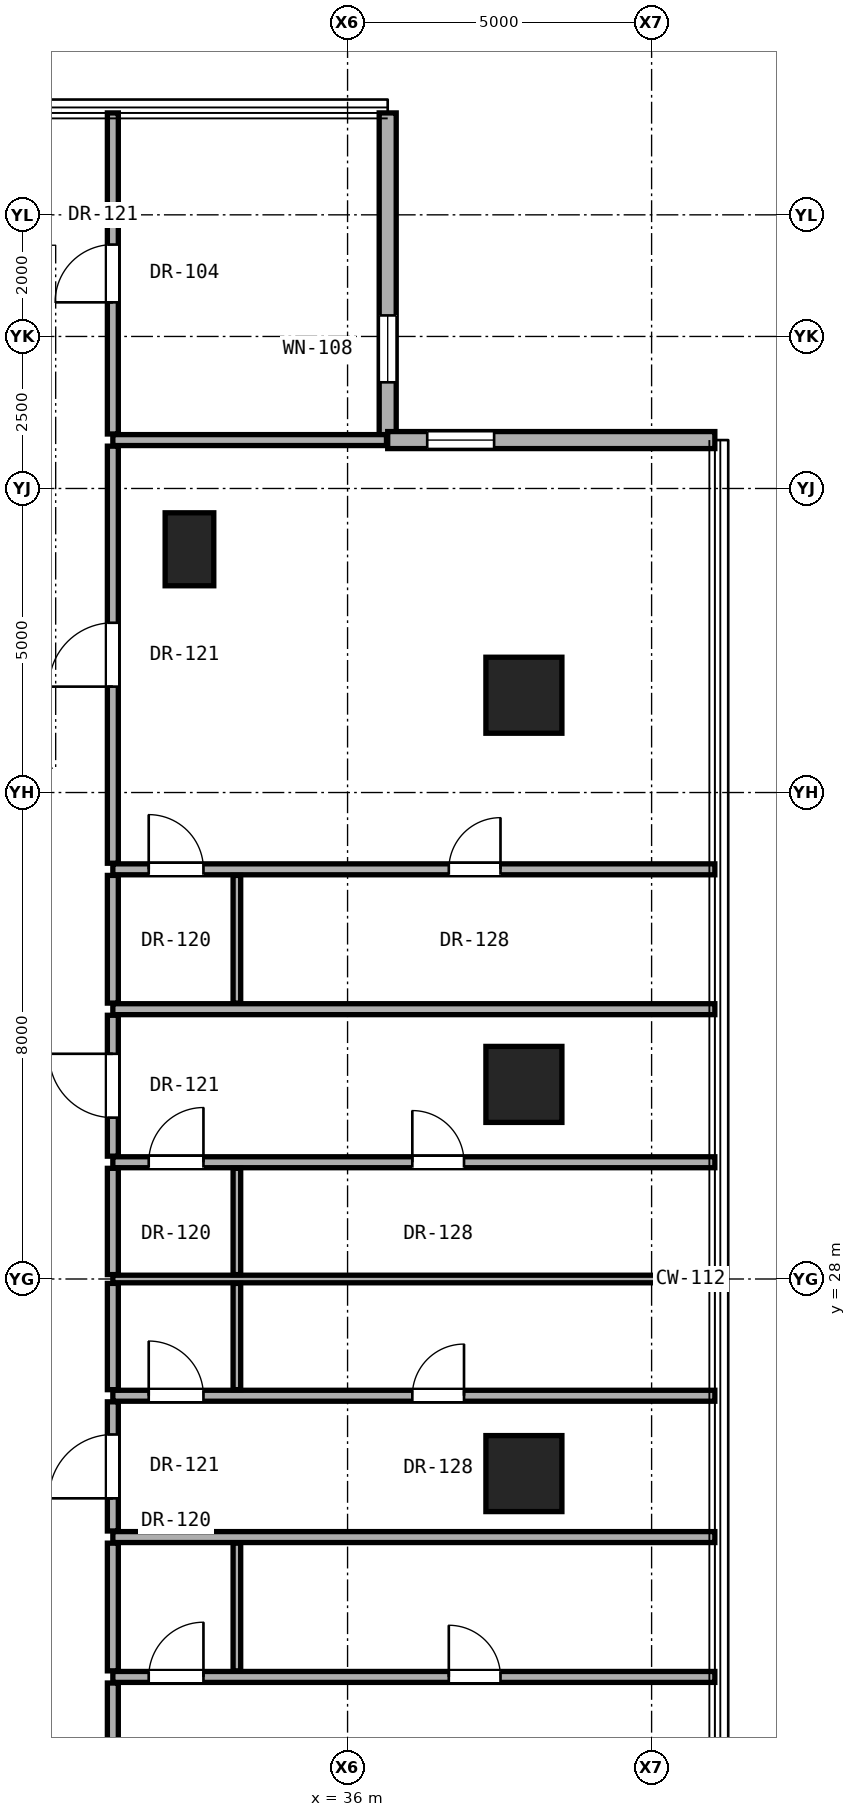
"""IFC4 building model, lengths in metres.
Left out: names, types, materials, properties, quantities, classifications, styles, units other than length and angle.
Written with IfcOpenShell. Run it as: python <this file> out.ifc"""

import sys

from ifc_helpers import new_model, si_unit, direction, frame, frame_2d, origin, origin_2d, place, context, subcontext, project, spatial, rectangle, hollow_rectangle, extrude, element, fill, save


model = new_model("IFC4")
c1 = context("Model", 3, precision=1e-05, world=origin(), true_north=direction((0.0, 1.0)))
c2 = subcontext(c1, "Body", "Model", "MODEL_VIEW")
j1 = project(units=[si_unit("LENGTHUNIT", "METRE"), si_unit("PLANEANGLEUNIT", "RADIAN")], contexts=[c1])
p1 = place(None, origin())
s1 = spatial("IfcSite", under=j1, at=p1, CompositionType="ELEMENT")
p2 = place(p1, origin())
s2 = spatial("IfcBuilding", under=s1, at=p2, CompositionType="ELEMENT")
p3 = place(p2, frame((0.0, 0.0, 29.0)))
s3 = spatial("IfcBuildingStorey", under=s2, at=p3, CompositionType="ELEMENT", Elevation=29.0)
for number, where, z_axis, x_axis in (
    (1, (38.9, 24.8, 0.0), (0.0, 0.0, 1.0), (1.0, 0.0, 0.0)),
    (2, (38.9, 31.2, 0.0), (0.0, 0.0, 1.0), (1.0, 0.0, 0.0)),
    (3, (38.9, 37.6, 0.0), (0.0, 0.0, 1.0), (1.0, 0.0, 0.0)),
):
    element("IfcColumn", number, at=place(p3, frame(where, z_axis=z_axis, x_axis=x_axis)), inside=s3, PredefinedType="COLUMN", context=c2, shape_type="SweptSolid", body=[
        extrude(hollow_rectangle(XDim=1.25, YDim=1.25, WallThickness=0.07, at=origin_2d()), origin(), (0.0, 0.0, 1.0), 3.3),
    ])
p4 = place(p3, frame((33.4, 40.0, 0.0), z_axis=(0.0, 0.0, 1.0), x_axis=(1.0, 0.0, 0.0)))
e4 = element("IfcColumn", 4, at=p4, inside=s3, PredefinedType="PILASTER", context=c2, shape_type="SweptSolid", body=[
    extrude(rectangle(XDim=0.8, YDim=1.2, at=origin_2d()), origin(), (0.0, 0.0, 1.0), 3.3),
])
p5 = place(p3, frame((36.66, 41.796, 0.0), z_axis=(0.0, 0.0, 1.0), x_axis=(0.0, 1.0, 0.0)))
e5 = element("IfcWall", 5, at=p5, inside=s3, PredefinedType="SOLIDWALL", context=c2, shape_type="SweptSolid", body=[
    extrude(rectangle(XDim=5.38, YDim=0.28, at=frame_2d((2.69, 0.0))), origin(), (0.0, 0.0, 1.0), 3.04),
])
p6 = place(p5, frame((0.95, 0.0, 0.85)))
e6 = element("IfcOpeningElement", 6, at=p6, cuts=e5, PredefinedType="OPENING", context=c2, shape_type="SweptSolid", body=[
    extrude(rectangle(XDim=1.1, YDim=2.0, at=frame_2d((0.55, 1.0))), frame((0.0, 0.15, 0.0), z_axis=(0.0, -1.0, 0.0), x_axis=(1.0, 0.0, 0.0)), (0.0, 0.0, 1.0), 0.3),
])
p7 = place(p3, frame((42.04, 41.796, 0.0), z_axis=(0.0, 0.0, 1.0), x_axis=(-1.0, 0.0, 0.0)))
e7 = element("IfcWall", 7, at=p7, inside=s3, PredefinedType="SOLIDWALL", context=c2, shape_type="SweptSolid", body=[
    extrude(rectangle(XDim=5.38, YDim=0.28, at=frame_2d((2.69, 0.0))), origin(), (0.0, 0.0, 1.0), 3.04),
])
p8 = place(p7, frame((3.63, 0.0, 0.85)))
e8 = element("IfcOpeningElement", 8, at=p8, cuts=e7, PredefinedType="OPENING", context=c2, shape_type="SweptSolid", body=[
    extrude(rectangle(XDim=1.1, YDim=2.0, at=frame_2d((0.55, 1.0))), frame((0.0, 0.15, 0.0), z_axis=(0.0, -1.0, 0.0), x_axis=(1.0, 0.0, 0.0)), (0.0, 0.0, 1.0), 0.3),
])
p9 = place(p3, frame((32.14, 21.456, 0.0), z_axis=(0.0, 0.0, 1.0), x_axis=(1.0, 0.0, 0.0)))
e9 = element("IfcWall", 9, at=p9, inside=s3, PredefinedType="PARTITIONING", context=c2, shape_type="SweptSolid", body=[
    extrude(rectangle(XDim=9.9, YDim=0.18, at=frame_2d((4.95, 0.0))), origin(), (0.0, 0.0, 1.0), 2.125),
])
p10 = place(p9, frame((5.525, 0.0, 0.0)))
e10 = element("IfcOpeningElement", 10, at=p10, cuts=e9, PredefinedType="OPENING", context=c2, shape_type="SweptSolid", body=[
    extrude(rectangle(XDim=0.85, YDim=2.01, at=frame_2d((0.425, 1.005))), frame((0.0, 0.1, 0.0), z_axis=(0.0, -1.0, 0.0), x_axis=(1.0, 0.0, 0.0)), (0.0, 0.0, 1.0), 0.2),
])
p11 = place(p9, frame((0.59, 0.0, 0.0)))
e11 = element("IfcOpeningElement", 11, at=p11, cuts=e9, PredefinedType="OPENING", context=c2, shape_type="SweptSolid", body=[
    extrude(rectangle(XDim=0.9, YDim=2.1, at=frame_2d((0.45, 1.05))), frame((0.0, 0.1, 0.0), z_axis=(0.0, -1.0, 0.0), x_axis=(1.0, 0.0, 0.0)), (0.0, 0.0, 1.0), 0.2),
])
p12 = place(p3, frame((32.14, 23.756, 0.0), z_axis=(0.0, 0.0, 1.0), x_axis=(1.0, 0.0, 0.0)))
e12 = element("IfcWall", 12, at=p12, inside=s3, PredefinedType="PARTITIONING", context=c2, shape_type="SweptSolid", body=[
    extrude(rectangle(XDim=9.9, YDim=0.18, at=frame_2d((4.95, 0.0))), origin(), (0.0, 0.0, 1.0), 2.125),
])
p13 = place(p3, frame((32.14, 26.08, 0.0), z_axis=(0.0, 0.0, 1.0), x_axis=(1.0, 0.0, 0.0)))
e13 = element("IfcWall", 13, at=p13, inside=s3, PredefinedType="PARTITIONING", context=c2, shape_type="SweptSolid", body=[
    extrude(rectangle(XDim=9.9, YDim=0.18, at=frame_2d((4.95, 0.0))), origin(), (0.0, 0.0, 1.0), 2.125),
])
p14 = place(p13, frame((4.925, 0.0, 0.0)))
e14 = element("IfcOpeningElement", 14, at=p14, cuts=e13, PredefinedType="OPENING", context=c2, shape_type="SweptSolid", body=[
    extrude(rectangle(XDim=0.85, YDim=2.01, at=frame_2d((0.425, 1.005))), frame((0.0, 0.1, 0.0), z_axis=(0.0, -1.0, 0.0), x_axis=(1.0, 0.0, 0.0)), (0.0, 0.0, 1.0), 0.2),
])
p15 = place(p13, frame((0.59, 0.0, 0.0)))
e15 = element("IfcOpeningElement", 15, at=p15, cuts=e13, PredefinedType="OPENING", context=c2, shape_type="SweptSolid", body=[
    extrude(rectangle(XDim=0.9, YDim=2.1, at=frame_2d((0.45, 1.05))), frame((0.0, 0.1, 0.0), z_axis=(0.0, -1.0, 0.0), x_axis=(1.0, 0.0, 0.0)), (0.0, 0.0, 1.0), 0.2),
])
p16 = place(p3, frame((32.14, 28.0, 0.0), z_axis=(0.0, 0.0, 1.0), x_axis=(1.0, 0.0, 0.0)))
e16 = element("IfcWall", 16, at=p16, inside=s3, PredefinedType="PARTITIONING", context=c2, shape_type="SweptSolid", body=[
    extrude(rectangle(XDim=9.9, YDim=0.125, at=frame_2d((4.95, 0.0))), origin(), (0.0, 0.0, 1.0), 2.125),
])
p17 = place(p3, frame((32.14, 29.92, 0.0), z_axis=(0.0, 0.0, 1.0), x_axis=(1.0, 0.0, 0.0)))
e17 = element("IfcWall", 17, at=p17, inside=s3, PredefinedType="PARTITIONING", context=c2, shape_type="SweptSolid", body=[
    extrude(rectangle(XDim=9.9, YDim=0.18, at=frame_2d((4.95, 0.0))), origin(), (0.0, 0.0, 1.0), 2.125),
])
p18 = place(p17, frame((4.925, 0.0, 0.0)))
e18 = element("IfcOpeningElement", 18, at=p18, cuts=e17, PredefinedType="OPENING", context=c2, shape_type="SweptSolid", body=[
    extrude(rectangle(XDim=0.85, YDim=2.01, at=frame_2d((0.425, 1.005))), frame((0.0, 0.1, 0.0), z_axis=(0.0, -1.0, 0.0), x_axis=(1.0, 0.0, 0.0)), (0.0, 0.0, 1.0), 0.2),
])
p19 = place(p17, frame((0.59, 0.0, 0.0)))
e19 = element("IfcOpeningElement", 19, at=p19, cuts=e17, PredefinedType="OPENING", context=c2, shape_type="SweptSolid", body=[
    extrude(rectangle(XDim=0.9, YDim=2.1, at=frame_2d((0.45, 1.05))), frame((0.0, 0.1, 0.0), z_axis=(0.0, -1.0, 0.0), x_axis=(1.0, 0.0, 0.0)), (0.0, 0.0, 1.0), 0.2),
])
p20 = place(p3, frame((32.14, 32.437, 0.0), z_axis=(0.0, 0.0, 1.0), x_axis=(1.0, 0.0, 0.0)))
e20 = element("IfcWall", 20, at=p20, inside=s3, PredefinedType="PARTITIONING", context=c2, shape_type="SweptSolid", body=[
    extrude(rectangle(XDim=9.9, YDim=0.18, at=frame_2d((4.95, 0.0))), origin(), (0.0, 0.0, 1.0), 2.125),
])
p21 = place(p3, frame((32.14, 34.737, 0.0), z_axis=(0.0, 0.0, 1.0), x_axis=(1.0, 0.0, 0.0)))
e21 = element("IfcWall", 21, at=p21, inside=s3, PredefinedType="PARTITIONING", context=c2, shape_type="SweptSolid", body=[
    extrude(rectangle(XDim=9.9, YDim=0.18, at=frame_2d((4.95, 0.0))), origin(), (0.0, 0.0, 1.0), 2.125),
])
p22 = place(p21, frame((5.525, 0.0, 0.0)))
e22 = element("IfcOpeningElement", 22, at=p22, cuts=e21, PredefinedType="OPENING", context=c2, shape_type="SweptSolid", body=[
    extrude(rectangle(XDim=0.85, YDim=2.01, at=frame_2d((0.425, 1.005))), frame((0.0, 0.1, 0.0), z_axis=(0.0, -1.0, 0.0), x_axis=(1.0, 0.0, 0.0)), (0.0, 0.0, 1.0), 0.2),
])
p23 = place(p21, frame((0.59, 0.0, 0.0)))
e23 = element("IfcOpeningElement", 23, at=p23, cuts=e21, PredefinedType="OPENING", context=c2, shape_type="SweptSolid", body=[
    extrude(rectangle(XDim=0.9, YDim=2.1, at=frame_2d((0.45, 1.05))), frame((0.0, 0.1, 0.0), z_axis=(0.0, -1.0, 0.0), x_axis=(1.0, 0.0, 0.0)), (0.0, 0.0, 1.0), 0.2),
])
p24 = place(p3, frame((32.14, 41.796, 0.0), z_axis=(0.0, 0.0, 1.0), x_axis=(1.0, 0.0, 0.0)))
e24 = element("IfcWall", 24, at=p24, inside=s3, PredefinedType="PARTITIONING", context=c2, shape_type="SweptSolid", body=[
    extrude(rectangle(XDim=4.5, YDim=0.18, at=frame_2d((2.25, 0.0))), origin(), (0.0, 0.0, 1.0), 3.06),
])
p25 = place(p3, frame((32.14, 14.304, 0.0), z_axis=(0.0, 0.0, 1.0), x_axis=(0.0, 1.0, 0.0)))
e25 = element("IfcWall", 25, at=p25, inside=s3, PredefinedType="PARTITIONING", context=c2, shape_type="SweptSolid", body=[
    extrude(rectangle(XDim=7.052, YDim=0.18, at=frame_2d((3.526, 0.0))), origin(), (0.0, 0.0, 1.0), 2.436),
])
p26 = place(p25, frame((3.001, 0.0, 0.0)))
e26 = element("IfcOpeningElement", 26, at=p26, cuts=e25, PredefinedType="OPENING", context=c2, shape_type="SweptSolid", body=[
    extrude(rectangle(XDim=1.05, YDim=2.2, at=frame_2d((0.525, 1.1))), frame((0.0, 0.1, 0.0), z_axis=(0.0, -1.0, 0.0), x_axis=(1.0, 0.0, 0.0)), (0.0, 0.0, 1.0), 0.2),
])
p27 = place(p3, frame((32.14, 21.556, 0.0), z_axis=(0.0, 0.0, 1.0), x_axis=(0.0, 1.0, 0.0)))
e27 = element("IfcWall", 27, at=p27, inside=s3, PredefinedType="PARTITIONING", context=c2, shape_type="SweptSolid", body=[
    extrude(rectangle(XDim=2.1, YDim=0.18, at=frame_2d((1.05, 0.0))), origin(), (0.0, 0.0, 1.0), 3.06),
])
p28 = place(p3, frame((32.14, 23.856, 0.0), z_axis=(0.0, 0.0, 1.0), x_axis=(0.0, 1.0, 0.0)))
e28 = element("IfcWall", 28, at=p28, inside=s3, PredefinedType="PARTITIONING", context=c2, shape_type="SweptSolid", body=[
    extrude(rectangle(XDim=2.124, YDim=0.18, at=frame_2d((1.062, 0.0))), origin(), (0.0, 0.0, 1.0), 2.279),
])
p29 = place(p28, frame((0.537, 0.0, 0.0)))
e29 = element("IfcOpeningElement", 29, at=p29, cuts=e28, PredefinedType="OPENING", context=c2, shape_type="SweptSolid", body=[
    extrude(rectangle(XDim=1.05, YDim=2.2, at=frame_2d((0.525, 1.1))), frame((0.0, 0.1, 0.0), z_axis=(0.0, -1.0, 0.0), x_axis=(1.0, 0.0, 0.0)), (0.0, 0.0, 1.0), 0.2),
])
for number, where, z_axis, x_axis in (
    (30, (32.14, 26.18, 0.0), (0.0, 0.0, 1.0), (0.0, 1.0, 0.0)),
    (31, (32.14, 28.073, 0.0), (0.0, 0.0, 1.0), (0.0, 1.0, 0.0)),
):
    element("IfcWall", number, at=place(p3, frame(where, z_axis=z_axis, x_axis=x_axis)), inside=s3, PredefinedType="PARTITIONING", context=c2, shape_type="SweptSolid", body=[
        extrude(rectangle(XDim=1.748, YDim=0.18, at=frame_2d((0.874, 0.0))), origin(), (0.0, 0.0, 1.0), 3.06),
    ])
p30 = place(p3, frame((32.14, 30.02, 0.0), z_axis=(0.0, 0.0, 1.0), x_axis=(0.0, 1.0, 0.0)))
e32 = element("IfcWall", 32, at=p30, inside=s3, PredefinedType="PARTITIONING", context=c2, shape_type="SweptSolid", body=[
    extrude(rectangle(XDim=2.317, YDim=0.18, at=frame_2d((1.158, 0.0))), origin(), (0.0, 0.0, 1.0), 2.279),
])
p31 = place(p30, frame((0.634, 0.0, 0.0)))
e33 = element("IfcOpeningElement", 33, at=p31, cuts=e32, PredefinedType="OPENING", context=c2, shape_type="SweptSolid", body=[
    extrude(rectangle(XDim=1.05, YDim=2.2, at=frame_2d((0.525, 1.1))), frame((0.0, 0.1, 0.0), z_axis=(0.0, -1.0, 0.0), x_axis=(1.0, 0.0, 0.0)), (0.0, 0.0, 1.0), 0.2),
])
p32 = place(p3, frame((32.14, 32.537, 0.0), z_axis=(0.0, 0.0, 1.0), x_axis=(0.0, 1.0, 0.0)))
e34 = element("IfcWall", 34, at=p32, inside=s3, PredefinedType="PARTITIONING", context=c2, shape_type="SweptSolid", body=[
    extrude(rectangle(XDim=2.1, YDim=0.18, at=frame_2d((1.05, 0.0))), origin(), (0.0, 0.0, 1.0), 3.06),
])
p33 = place(p3, frame((32.14, 34.837, 0.0), z_axis=(0.0, 0.0, 1.0), x_axis=(0.0, 1.0, 0.0)))
e35 = element("IfcWall", 35, at=p33, inside=s3, PredefinedType="PARTITIONING", context=c2, shape_type="SweptSolid", body=[
    extrude(rectangle(XDim=6.859, YDim=0.18, at=frame_2d((3.43, 0.0))), origin(), (0.0, 0.0, 1.0), 2.436),
])
p34 = place(p33, frame((2.905, 0.0, 0.0)))
e36 = element("IfcOpeningElement", 36, at=p34, cuts=e35, PredefinedType="OPENING", context=c2, shape_type="SweptSolid", body=[
    extrude(rectangle(XDim=1.05, YDim=2.2, at=frame_2d((0.525, 1.1))), frame((0.0, 0.1, 0.0), z_axis=(0.0, -1.0, 0.0), x_axis=(1.0, 0.0, 0.0)), (0.0, 0.0, 1.0), 0.2),
])
p35 = place(p3, frame((32.14, 41.896, 0.0), z_axis=(0.0, 0.0, 1.0), x_axis=(0.0, 1.0, 0.0)))
e37 = element("IfcWall", 37, at=p35, inside=s3, PredefinedType="PARTITIONING", context=c2, shape_type="SweptSolid", body=[
    extrude(rectangle(XDim=5.28, YDim=0.18, at=frame_2d((2.64, 0.0))), origin(), (0.0, 0.0, 1.0), 3.06),
])
p36 = place(p35, frame((2.165, 0.0, 0.0)))
e38 = element("IfcOpeningElement", 38, at=p36, cuts=e37, PredefinedType="OPENING", context=c2, shape_type="SweptSolid", body=[
    extrude(rectangle(XDim=0.95, YDim=2.15, at=frame_2d((0.475, 1.075))), frame((0.0, 0.1, 0.0), z_axis=(0.0, -1.0, 0.0), x_axis=(1.0, 0.0, 0.0)), (0.0, 0.0, 1.0), 0.2),
])
p37 = place(p3, frame((34.18, 21.556, 0.0), z_axis=(0.0, 0.0, 1.0), x_axis=(0.0, 1.0, 0.0)))
e39 = element("IfcWall", 39, at=p37, inside=s3, PredefinedType="PARTITIONING", context=c2, shape_type="SweptSolid", body=[
    extrude(rectangle(XDim=2.1, YDim=0.125, at=frame_2d((1.05, 0.0))), origin(), (0.0, 0.0, 1.0), 3.06),
])
for number, where, z_axis, x_axis in (
    (40, (34.18, 26.18, 0.0), (0.0, 0.0, 1.0), (0.0, 1.0, 0.0)),
    (41, (34.18, 28.073, 0.0), (0.0, 0.0, 1.0), (0.0, 1.0, 0.0)),
):
    element("IfcWall", number, at=place(p3, frame(where, z_axis=z_axis, x_axis=x_axis)), inside=s3, PredefinedType="PARTITIONING", context=c2, shape_type="SweptSolid", body=[
        extrude(rectangle(XDim=1.748, YDim=0.125, at=frame_2d((0.874, 0.0))), origin(), (0.0, 0.0, 1.0), 3.06),
    ])
p38 = place(p3, frame((34.18, 32.537, 0.0), z_axis=(0.0, 0.0, 1.0), x_axis=(0.0, 1.0, 0.0)))
e42 = element("IfcWall", 42, at=p38, inside=s3, PredefinedType="PARTITIONING", context=c2, shape_type="SweptSolid", body=[
    extrude(rectangle(XDim=2.1, YDim=0.125, at=frame_2d((1.05, 0.0))), origin(), (0.0, 0.0, 1.0), 3.06),
])
p39 = place(p6, origin())
e43 = element("IfcWindow", 43, at=p39, inside=s3, PartitioningType="SINGLE_PANEL", PredefinedType="WINDOW", context=c2, shape_type="SweptSolid", body=[
    extrude(rectangle(XDim=1.1, YDim=2.0, at=frame_2d((0.55, 1.0))), frame((0.0, 0.03, 0.0), z_axis=(0.0, -1.0, 0.0), x_axis=(1.0, 0.0, 0.0)), (0.0, 0.0, 1.0), 0.06),
])
fill(e6, e43)
p40 = place(p8, origin())
e44 = element("IfcWindow", 44, at=p40, inside=s3, PartitioningType="SINGLE_PANEL", PredefinedType="WINDOW", context=c2, shape_type="SweptSolid", body=[
    extrude(rectangle(XDim=1.1, YDim=2.0, at=frame_2d((0.55, 1.0))), frame((0.0, 0.03, 0.0), z_axis=(0.0, -1.0, 0.0), x_axis=(1.0, 0.0, 0.0)), (0.0, 0.0, 1.0), 0.06),
])
fill(e8, e44)
p41 = place(p10, origin())
e45 = element("IfcDoor", 45, at=p41, inside=s3, OperationType="SINGLE_SWING_LEFT", PredefinedType="DOOR", context=c2, shape_type="SweptSolid", body=[
    extrude(rectangle(XDim=0.85, YDim=2.01, at=frame_2d((0.425, 1.005))), frame((0.0, 0.025, 0.0), z_axis=(0.0, -1.0, 0.0), x_axis=(1.0, 0.0, 0.0)), (0.0, 0.0, 1.0), 0.05),
])
fill(e10, e45)
p42 = place(p11, origin())
e46 = element("IfcDoor", 46, at=p42, inside=s3, OperationType="SINGLE_SWING_RIGHT", PredefinedType="DOOR", context=c2, shape_type="SweptSolid", body=[
    extrude(rectangle(XDim=0.9, YDim=2.1, at=frame_2d((0.45, 1.05))), frame((0.0, 0.025, 0.0), z_axis=(0.0, -1.0, 0.0), x_axis=(1.0, 0.0, 0.0)), (0.0, 0.0, 1.0), 0.05),
])
fill(e11, e46)
p43 = place(p29, origin())
e47 = element("IfcDoor", 47, at=p43, inside=s3, OperationType="SINGLE_SWING_LEFT", PredefinedType="DOOR", context=c2, shape_type="SweptSolid", body=[
    extrude(rectangle(XDim=1.05, YDim=2.2, at=frame_2d((0.525, 1.1))), frame((0.0, 0.025, 0.0), z_axis=(0.0, -1.0, 0.0), x_axis=(1.0, 0.0, 0.0)), (0.0, 0.0, 1.0), 0.05),
])
fill(e29, e47)
p44 = place(p14, origin())
e48 = element("IfcDoor", 48, at=p44, inside=s3, OperationType="SINGLE_SWING_RIGHT", PredefinedType="DOOR", context=c2, shape_type="SweptSolid", body=[
    extrude(rectangle(XDim=0.85, YDim=2.01, at=frame_2d((0.425, 1.005))), frame((0.0, 0.025, 0.0), z_axis=(0.0, -1.0, 0.0), x_axis=(1.0, 0.0, 0.0)), (0.0, 0.0, 1.0), 0.05),
])
fill(e14, e48)
p45 = place(p15, origin())
e49 = element("IfcDoor", 49, at=p45, inside=s3, OperationType="SINGLE_SWING_LEFT", PredefinedType="DOOR", context=c2, shape_type="SweptSolid", body=[
    extrude(rectangle(XDim=0.9, YDim=2.1, at=frame_2d((0.45, 1.05))), frame((0.0, 0.025, 0.0), z_axis=(0.0, -1.0, 0.0), x_axis=(1.0, 0.0, 0.0)), (0.0, 0.0, 1.0), 0.05),
])
fill(e15, e49)
p46 = place(p31, origin())
e50 = element("IfcDoor", 50, at=p46, inside=s3, OperationType="SINGLE_SWING_RIGHT", PredefinedType="DOOR", context=c2, shape_type="SweptSolid", body=[
    extrude(rectangle(XDim=1.05, YDim=2.2, at=frame_2d((0.525, 1.1))), frame((0.0, 0.025, 0.0), z_axis=(0.0, -1.0, 0.0), x_axis=(1.0, 0.0, 0.0)), (0.0, 0.0, 1.0), 0.05),
])
fill(e33, e50)
p47 = place(p18, origin())
e51 = element("IfcDoor", 51, at=p47, inside=s3, OperationType="SINGLE_SWING_LEFT", PredefinedType="DOOR", context=c2, shape_type="SweptSolid", body=[
    extrude(rectangle(XDim=0.85, YDim=2.01, at=frame_2d((0.425, 1.005))), frame((0.0, 0.025, 0.0), z_axis=(0.0, -1.0, 0.0), x_axis=(1.0, 0.0, 0.0)), (0.0, 0.0, 1.0), 0.05),
])
fill(e18, e51)
p48 = place(p19, origin())
e52 = element("IfcDoor", 52, at=p48, inside=s3, OperationType="SINGLE_SWING_RIGHT", PredefinedType="DOOR", context=c2, shape_type="SweptSolid", body=[
    extrude(rectangle(XDim=0.9, YDim=2.1, at=frame_2d((0.45, 1.05))), frame((0.0, 0.025, 0.0), z_axis=(0.0, -1.0, 0.0), x_axis=(1.0, 0.0, 0.0)), (0.0, 0.0, 1.0), 0.05),
])
fill(e19, e52)
p49 = place(p34, origin())
e53 = element("IfcDoor", 53, at=p49, inside=s3, OperationType="SINGLE_SWING_LEFT", PredefinedType="DOOR", context=c2, shape_type="SweptSolid", body=[
    extrude(rectangle(XDim=1.05, YDim=2.2, at=frame_2d((0.525, 1.1))), frame((0.0, 0.025, 0.0), z_axis=(0.0, -1.0, 0.0), x_axis=(1.0, 0.0, 0.0)), (0.0, 0.0, 1.0), 0.05),
])
fill(e36, e53)
p50 = place(p22, origin())
e54 = element("IfcDoor", 54, at=p50, inside=s3, OperationType="SINGLE_SWING_RIGHT", PredefinedType="DOOR", context=c2, shape_type="SweptSolid", body=[
    extrude(rectangle(XDim=0.85, YDim=2.01, at=frame_2d((0.425, 1.005))), frame((0.0, 0.025, 0.0), z_axis=(0.0, -1.0, 0.0), x_axis=(1.0, 0.0, 0.0)), (0.0, 0.0, 1.0), 0.05),
])
fill(e22, e54)
p51 = place(p23, origin())
e55 = element("IfcDoor", 55, at=p51, inside=s3, OperationType="SINGLE_SWING_LEFT", PredefinedType="DOOR", context=c2, shape_type="SweptSolid", body=[
    extrude(rectangle(XDim=0.9, YDim=2.1, at=frame_2d((0.45, 1.05))), frame((0.0, 0.025, 0.0), z_axis=(0.0, -1.0, 0.0), x_axis=(1.0, 0.0, 0.0)), (0.0, 0.0, 1.0), 0.05),
])
fill(e23, e55)
p52 = place(p36, origin())
e56 = element("IfcDoor", 56, at=p52, inside=s3, OperationType="SINGLE_SWING_LEFT", PredefinedType="DOOR", context=c2, shape_type="SweptSolid", body=[
    extrude(rectangle(XDim=0.95, YDim=2.15, at=frame_2d((0.475, 1.075))), frame((0.0, 0.025, 0.0), z_axis=(0.0, -1.0, 0.0), x_axis=(1.0, 0.0, 0.0)), (0.0, 0.0, 1.0), 0.05),
])
fill(e38, e56)
save(model, sys.argv[1])
